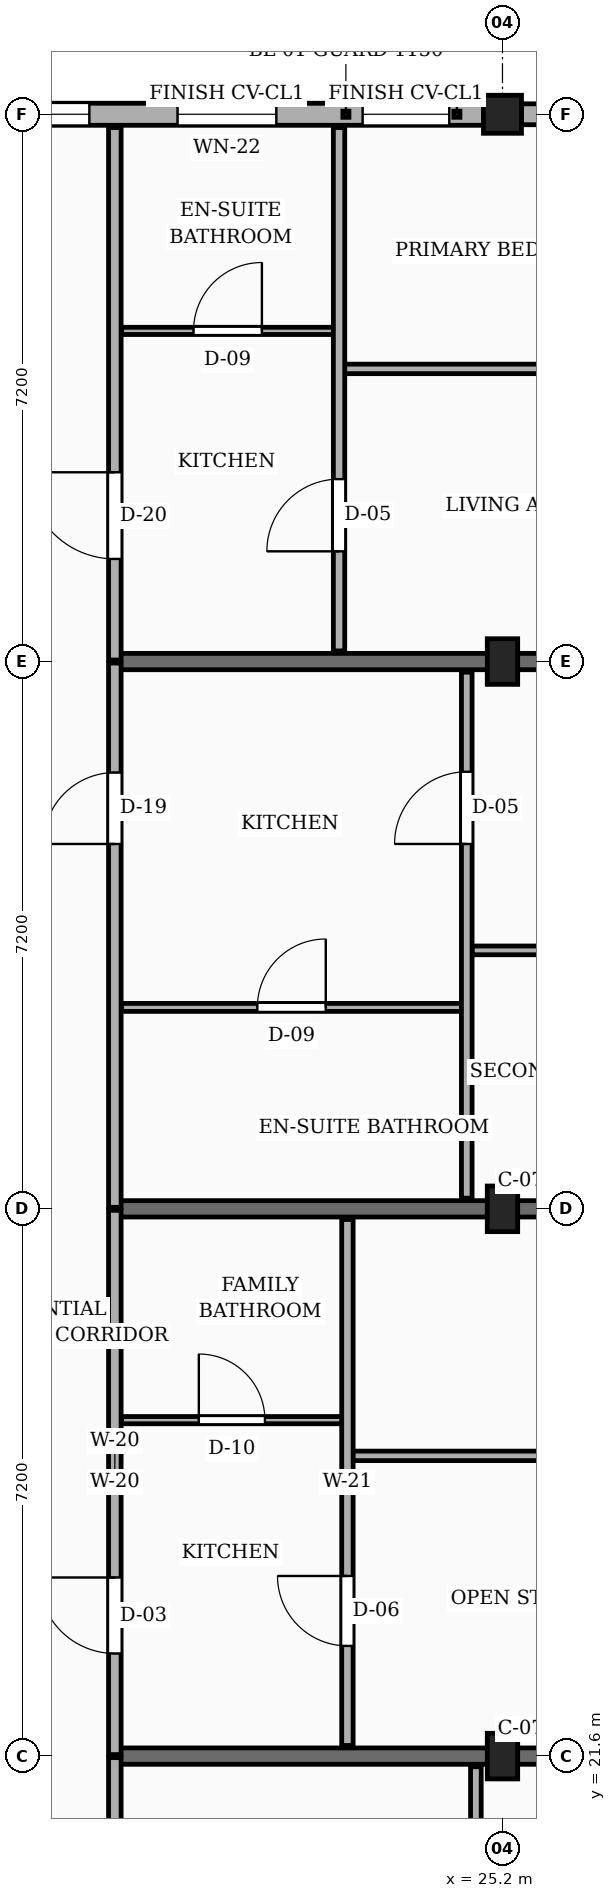
"""IFC4 building model, lengths in metres.
Left out: names, types, materials, properties, quantities, classifications, styles, units other than length and angle.
Written with IfcOpenShell. Run it as: python <this file> out.ifc"""

import sys

from ifc_helpers import new_model, si_unit, direction, frame, frame_2d, origin, origin_2d, place, context, subcontext, project, spatial, rectangle, extrude, element, fill, save


model = new_model("IFC4")
c1 = context("Model", 3, precision=1e-05, world=origin(), true_north=direction((0.0, 1.0)))
c2 = subcontext(c1, "Body", "Model", "MODEL_VIEW")
j1 = project(units=[si_unit("LENGTHUNIT", "METRE"), si_unit("PLANEANGLEUNIT", "RADIAN")], contexts=[c1])
p1 = place(None, origin())
s1 = spatial("IfcSite", under=j1, at=p1, CompositionType="ELEMENT")
p2 = place(p1, origin())
s2 = spatial("IfcBuilding", under=s1, at=p2, CompositionType="ELEMENT")
p3 = place(p2, frame((0.0, 0.0, 26.55)))
s3 = spatial("IfcBuildingStorey", under=s2, at=p3, CompositionType="ELEMENT", Elevation=26.55)
for number, where, z_axis, x_axis in (
    (1, (25.2, 21.6, 0.0), (0.0, 0.0, 1.0), (1.0, 0.0, 0.0)),
    (2, (25.2, 28.8, 0.0), (0.0, 0.0, 1.0), (1.0, 0.0, 0.0)),
    (3, (25.2, 36.0, 0.0), (0.0, 0.0, 1.0), (1.0, 0.0, 0.0)),
):
    element("IfcColumn", number, at=place(p3, frame(where, z_axis=z_axis, x_axis=x_axis)), inside=s3, PredefinedType="COLUMN", context=c2, shape_type="SweptSolid", body=[
        extrude(rectangle(XDim=0.4, YDim=0.6, at=origin_2d()), origin(), (0.0, 0.0, 1.0), 3.15),
    ])
p4 = place(p3, frame((25.2, 43.2, 0.0), z_axis=(0.0, 0.0, 1.0), x_axis=(1.0, 0.0, 0.0)))
e4 = element("IfcColumn", 4, at=p4, inside=s3, PredefinedType="COLUMN", context=c2, shape_type="SweptSolid", body=[
    extrude(rectangle(XDim=0.5, YDim=0.5, at=origin_2d()), origin(), (0.0, 0.0, 1.0), 3.15),
])
for number, where, z_axis, x_axis in (
    (5, (20.1, 21.6, 0.0), (0.0, 0.0, 1.0), (1.0, 0.0, 0.0)),
    (6, (20.1, 28.8, 0.0), (0.0, 0.0, 1.0), (1.0, 0.0, 0.0)),
    (7, (20.1, 36.0, 0.0), (0.0, 0.0, 1.0), (1.0, 0.0, 0.0)),
):
    element("IfcWall", number, at=place(p3, frame(where, z_axis=z_axis, x_axis=x_axis)), inside=s3, PredefinedType="SOLIDWALL", context=c2, shape_type="SweptSolid", body=[
        extrude(rectangle(XDim=12.05, YDim=0.215, at=frame_2d((6.025, 0.0))), origin(), (0.0, 0.0, 1.0), 2.17),
    ])
p5 = place(p3, frame((32.15, 43.2, 0.0), z_axis=(0.0, 0.0, 1.0), x_axis=(-1.0, 0.0, 0.0)))
e8 = element("IfcWall", 8, at=p5, inside=s3, PredefinedType="SOLIDWALL", context=c2, shape_type="SweptSolid", body=[
    extrude(rectangle(XDim=6.7, YDim=0.275, at=frame_2d((3.35, 0.0))), origin(), (0.0, 0.0, 1.0), 2.44),
])
p6 = place(p5, frame((0.45, 0.0, 0.78)))
e9 = element("IfcOpeningElement", 9, at=p6, cuts=e8, PredefinedType="OPENING", context=c2, shape_type="SweptSolid", body=[
    extrude(rectangle(XDim=0.98, YDim=1.36, at=frame_2d((0.49, 0.68))), frame((0.0, 0.147, 0.0), z_axis=(0.0, -1.0, 0.0), x_axis=(1.0, 0.0, 0.0)), (0.0, 0.0, 1.0), 0.295),
])
p7 = place(p5, frame((4.65, 0.0, 0.78)))
e10 = element("IfcOpeningElement", 10, at=p7, cuts=e8, PredefinedType="OPENING", context=c2, shape_type="SweptSolid", body=[
    extrude(rectangle(XDim=1.14, YDim=1.36, at=frame_2d((0.57, 0.68))), frame((0.0, 0.147, 0.0), z_axis=(0.0, -1.0, 0.0), x_axis=(1.0, 0.0, 0.0)), (0.0, 0.0, 1.0), 0.295),
])
p8 = place(p3, frame((24.95, 43.2, 0.0), z_axis=(0.0, 0.0, 1.0), x_axis=(-1.0, 0.0, 0.0)))
e11 = element("IfcWall", 11, at=p8, inside=s3, PredefinedType="SOLIDWALL", context=c2, shape_type="SweptSolid", body=[
    extrude(rectangle(XDim=6.7, YDim=0.29, at=frame_2d((3.35, 0.0))), origin(), (0.0, 0.0, 1.0), 2.44),
])
p9 = place(p8, frame((0.45, 0.0, 0.78)))
e12 = element("IfcOpeningElement", 12, at=p9, cuts=e11, PredefinedType="OPENING", context=c2, shape_type="SweptSolid", body=[
    extrude(rectangle(XDim=1.14, YDim=1.36, at=frame_2d((0.57, 0.68))), frame((0.0, 0.155, 0.0), z_axis=(0.0, -1.0, 0.0), x_axis=(1.0, 0.0, 0.0)), (0.0, 0.0, 1.0), 0.31),
])
p10 = place(p8, frame((2.725, 0.0, 0.78)))
e13 = element("IfcOpeningElement", 13, at=p10, cuts=e11, PredefinedType="OPENING", context=c2, shape_type="SweptSolid", body=[
    extrude(rectangle(XDim=1.3, YDim=1.36, at=frame_2d((0.65, 0.68))), frame((0.0, 0.155, 0.0), z_axis=(0.0, -1.0, 0.0), x_axis=(1.0, 0.0, 0.0)), (0.0, 0.0, 1.0), 0.31),
])
p11 = place(p8, frame((5.185, 0.0, 0.78)))
e14 = element("IfcOpeningElement", 14, at=p11, cuts=e11, PredefinedType="OPENING", context=c2, shape_type="SweptSolid", body=[
    extrude(rectangle(XDim=1.04, YDim=1.26, at=frame_2d((0.52, 0.63))), frame((0.0, 0.155, 0.0), z_axis=(0.0, -1.0, 0.0), x_axis=(1.0, 0.0, 0.0)), (0.0, 0.0, 1.0), 0.31),
])
p12 = place(p3, frame((20.1, 14.42, 0.0), z_axis=(0.0, 0.0, 1.0), x_axis=(0.0, 1.0, 0.0)))
e15 = element("IfcWall", 15, at=p12, inside=s3, PredefinedType="PARTITIONING", context=c2, shape_type="SweptSolid", body=[
    extrude(rectangle(XDim=7.16, YDim=0.165, at=frame_2d((3.58, 0.0))), origin(), (0.0, 0.0, 1.0), 2.305),
])
p13 = place(p12, frame((4.78, 0.0, 0.0)))
e16 = element("IfcOpeningElement", 16, at=p13, cuts=e15, PredefinedType="OPENING", context=c2, shape_type="SweptSolid", body=[
    extrude(rectangle(XDim=1.14, YDim=2.18, at=frame_2d((0.57, 1.09))), frame((0.0, 0.093, 0.0), z_axis=(0.0, -1.0, 0.0), x_axis=(1.0, 0.0, 0.0)), (0.0, 0.0, 1.0), 0.185),
])
p14 = place(p3, frame((20.1, 21.62, 0.0), z_axis=(0.0, 0.0, 1.0), x_axis=(0.0, 1.0, 0.0)))
e17 = element("IfcWall", 17, at=p14, inside=s3, PredefinedType="PARTITIONING", context=c2, shape_type="SweptSolid", body=[
    extrude(rectangle(XDim=7.16, YDim=0.165, at=frame_2d((3.58, 0.0))), origin(), (0.0, 0.0, 1.0), 2.305),
])
p15 = place(p14, frame((1.33, 0.0, 0.0)))
e18 = element("IfcOpeningElement", 18, at=p15, cuts=e17, PredefinedType="OPENING", context=c2, shape_type="SweptSolid", body=[
    extrude(rectangle(XDim=1.0, YDim=2.15, at=frame_2d((0.5, 1.075))), frame((0.0, 0.093, 0.0), z_axis=(0.0, -1.0, 0.0), x_axis=(1.0, 0.0, 0.0)), (0.0, 0.0, 1.0), 0.185),
])
p16 = place(p3, frame((20.1, 28.82, 0.0), z_axis=(0.0, 0.0, 1.0), x_axis=(0.0, 1.0, 0.0)))
e19 = element("IfcWall", 19, at=p16, inside=s3, PredefinedType="PARTITIONING", context=c2, shape_type="SweptSolid", body=[
    extrude(rectangle(XDim=7.16, YDim=0.165, at=frame_2d((3.58, 0.0))), origin(), (0.0, 0.0, 1.0), 2.305),
])
p17 = place(p16, frame((4.78, 0.0, 0.0)))
e20 = element("IfcOpeningElement", 20, at=p17, cuts=e19, PredefinedType="OPENING", context=c2, shape_type="SweptSolid", body=[
    extrude(rectangle(XDim=0.94, YDim=2.12, at=frame_2d((0.47, 1.06))), frame((0.0, 0.093, 0.0), z_axis=(0.0, -1.0, 0.0), x_axis=(1.0, 0.0, 0.0)), (0.0, 0.0, 1.0), 0.185),
])
p18 = place(p3, frame((20.1, 36.02, 0.0), z_axis=(0.0, 0.0, 1.0), x_axis=(0.0, 1.0, 0.0)))
e21 = element("IfcWall", 21, at=p18, inside=s3, PredefinedType="PARTITIONING", context=c2, shape_type="SweptSolid", body=[
    extrude(rectangle(XDim=7.005, YDim=0.165, at=frame_2d((3.502, 0.0))), origin(), (0.0, 0.0, 1.0), 2.305),
])
p19 = place(p18, frame((1.33, 0.0, 0.0)))
e22 = element("IfcOpeningElement", 22, at=p19, cuts=e21, PredefinedType="OPENING", context=c2, shape_type="SweptSolid", body=[
    extrude(rectangle(XDim=1.14, YDim=2.18, at=frame_2d((0.57, 1.09))), frame((0.0, 0.093, 0.0), z_axis=(0.0, -1.0, 0.0), x_axis=(1.0, 0.0, 0.0)), (0.0, 0.0, 1.0), 0.185),
])
p20 = place(p3, frame((24.85, 14.54, 0.0), z_axis=(0.0, 0.0, 1.0), x_axis=(0.0, 1.0, 0.0)))
e23 = element("IfcWall", 23, at=p20, inside=s3, PredefinedType="PARTITIONING", context=c2, shape_type="SweptSolid", body=[
    extrude(rectangle(XDim=6.92, YDim=0.14, at=frame_2d((3.46, 0.0))), origin(), (0.0, 0.0, 1.0), 2.305),
])
p21 = place(p20, frame((4.66, 0.0, 0.0)))
e24 = element("IfcOpeningElement", 24, at=p21, cuts=e23, PredefinedType="OPENING", context=c2, shape_type="SweptSolid", body=[
    extrude(rectangle(XDim=0.95, YDim=2.1, at=frame_2d((0.475, 1.05))), frame((0.0, 0.08, 0.0), z_axis=(0.0, -1.0, 0.0), x_axis=(1.0, 0.0, 0.0)), (0.0, 0.0, 1.0), 0.16),
])
p22 = place(p3, frame((23.23, 25.55, 0.0), z_axis=(0.0, 0.0, 1.0), x_axis=(1.0, 0.0, 0.0)))
e25 = element("IfcWall", 25, at=p22, inside=s3, PredefinedType="PARTITIONING", context=c2, shape_type="SweptSolid", body=[
    extrude(rectangle(XDim=8.995, YDim=0.125, at=frame_2d((4.498, 0.0))), origin(), (0.0, 0.0, 1.0), 2.305),
])
p23 = place(p22, frame((4.058, 0.0, 0.0)))
e26 = element("IfcOpeningElement", 26, at=p23, cuts=e25, PredefinedType="OPENING", context=c2, shape_type="SweptSolid", body=[
    extrude(rectangle(XDim=0.88, YDim=2.08, at=frame_2d((0.44, 1.04))), frame((0.0, 0.073, 0.0), z_axis=(0.0, -1.0, 0.0), x_axis=(1.0, 0.0, 0.0)), (0.0, 0.0, 1.0), 0.145),
])
p24 = place(p3, frame((20.19, 26.02, 0.0), z_axis=(0.0, 0.0, 1.0), x_axis=(1.0, 0.0, 0.0)))
e27 = element("IfcWall", 27, at=p24, inside=s3, PredefinedType="PARTITIONING", context=c2, shape_type="SweptSolid", body=[
    extrude(rectangle(XDim=2.9, YDim=0.095, at=frame_2d((1.45, 0.0))), origin(), (0.0, 0.0, 1.0), 2.305),
])
p25 = place(p24, frame((1.015, 0.0, 0.0)))
e28 = element("IfcOpeningElement", 28, at=p25, cuts=e27, PredefinedType="OPENING", context=c2, shape_type="SweptSolid", body=[
    extrude(rectangle(XDim=0.87, YDim=2.05, at=frame_2d((0.435, 1.025))), frame((0.0, 0.058, 0.0), z_axis=(0.0, -1.0, 0.0), x_axis=(1.0, 0.0, 0.0)), (0.0, 0.0, 1.0), 0.115),
])
p26 = place(p3, frame((23.16, 21.74, 0.0), z_axis=(0.0, 0.0, 1.0), x_axis=(0.0, 1.0, 0.0)))
e29 = element("IfcWall", 29, at=p26, inside=s3, PredefinedType="PARTITIONING", context=c2, shape_type="SweptSolid", body=[
    extrude(rectangle(XDim=6.92, YDim=0.15, at=frame_2d((3.46, 0.0))), origin(), (0.0, 0.0, 1.0), 2.305),
])
p27 = place(p26, frame((1.31, 0.0, 0.0)))
e30 = element("IfcOpeningElement", 30, at=p27, cuts=e29, PredefinedType="OPENING", context=c2, shape_type="SweptSolid", body=[
    extrude(rectangle(XDim=0.92, YDim=2.1, at=frame_2d((0.46, 1.05))), frame((0.0, 0.085, 0.0), z_axis=(0.0, -1.0, 0.0), x_axis=(1.0, 0.0, 0.0)), (0.0, 0.0, 1.0), 0.17),
])
p28 = place(p3, frame((24.8, 32.2, 0.0), z_axis=(0.0, 0.0, 1.0), x_axis=(1.0, 0.0, 0.0)))
e31 = element("IfcWall", 31, at=p28, inside=s3, PredefinedType="PARTITIONING", context=c2, shape_type="SweptSolid", body=[
    extrude(rectangle(XDim=7.425, YDim=0.115, at=frame_2d((3.712, 0.0))), origin(), (0.0, 0.0, 1.0), 2.305),
])
p29 = place(p28, frame((3.262, 0.0, 0.0)))
e32 = element("IfcOpeningElement", 32, at=p29, cuts=e31, PredefinedType="OPENING", context=c2, shape_type="SweptSolid", body=[
    extrude(rectangle(XDim=0.9, YDim=2.1, at=frame_2d((0.45, 1.05))), frame((0.0, 0.067, 0.0), z_axis=(0.0, -1.0, 0.0), x_axis=(1.0, 0.0, 0.0)), (0.0, 0.0, 1.0), 0.135),
])
p30 = place(p3, frame((20.19, 31.45, 0.0), z_axis=(0.0, 0.0, 1.0), x_axis=(1.0, 0.0, 0.0)))
e33 = element("IfcWall", 33, at=p30, inside=s3, PredefinedType="PARTITIONING", context=c2, shape_type="SweptSolid", body=[
    extrude(rectangle(XDim=4.47, YDim=0.105, at=frame_2d((2.235, 0.0))), origin(), (0.0, 0.0, 1.0), 2.305),
])
p31 = place(p30, frame((1.785, 0.0, 0.0)))
e34 = element("IfcOpeningElement", 34, at=p31, cuts=e33, PredefinedType="OPENING", context=c2, shape_type="SweptSolid", body=[
    extrude(rectangle(XDim=0.9, YDim=2.05, at=frame_2d((0.45, 1.025))), frame((0.0, 0.062, 0.0), z_axis=(0.0, -1.0, 0.0), x_axis=(1.0, 0.0, 0.0)), (0.0, 0.0, 1.0), 0.125),
])
p32 = place(p3, frame((24.73, 28.94, 0.0), z_axis=(0.0, 0.0, 1.0), x_axis=(0.0, 1.0, 0.0)))
e35 = element("IfcWall", 35, at=p32, inside=s3, PredefinedType="PARTITIONING", context=c2, shape_type="SweptSolid", body=[
    extrude(rectangle(XDim=6.92, YDim=0.14, at=frame_2d((3.46, 0.0))), origin(), (0.0, 0.0, 1.0), 2.305),
])
p33 = place(p32, frame((4.66, 0.0, 0.0)))
e36 = element("IfcOpeningElement", 36, at=p33, cuts=e35, PredefinedType="OPENING", context=c2, shape_type="SweptSolid", body=[
    extrude(rectangle(XDim=0.95, YDim=2.1, at=frame_2d((0.475, 1.05))), frame((0.0, 0.08, 0.0), z_axis=(0.0, -1.0, 0.0), x_axis=(1.0, 0.0, 0.0)), (0.0, 0.0, 1.0), 0.16),
])
p34 = place(p3, frame((23.12, 39.85, 0.0), z_axis=(0.0, 0.0, 1.0), x_axis=(1.0, 0.0, 0.0)))
e37 = element("IfcWall", 37, at=p34, inside=s3, PredefinedType="PARTITIONING", context=c2, shape_type="SweptSolid", body=[
    extrude(rectangle(XDim=9.105, YDim=0.125, at=frame_2d((4.552, 0.0))), origin(), (0.0, 0.0, 1.0), 2.305),
])
p35 = place(p34, frame((4.103, 0.0, 0.0)))
e38 = element("IfcOpeningElement", 38, at=p35, cuts=e37, PredefinedType="OPENING", context=c2, shape_type="SweptSolid", body=[
    extrude(rectangle(XDim=0.9, YDim=2.1, at=frame_2d((0.45, 1.05))), frame((0.0, 0.073, 0.0), z_axis=(0.0, -1.0, 0.0), x_axis=(1.0, 0.0, 0.0)), (0.0, 0.0, 1.0), 0.145),
])
p36 = place(p3, frame((20.19, 40.35, 0.0), z_axis=(0.0, 0.0, 1.0), x_axis=(1.0, 0.0, 0.0)))
e39 = element("IfcWall", 39, at=p36, inside=s3, PredefinedType="PARTITIONING", context=c2, shape_type="SweptSolid", body=[
    extrude(rectangle(XDim=2.79, YDim=0.095, at=frame_2d((1.395, 0.0))), origin(), (0.0, 0.0, 1.0), 2.305),
])
p37 = place(p36, frame((0.945, 0.0, 0.0)))
e40 = element("IfcOpeningElement", 40, at=p37, cuts=e39, PredefinedType="OPENING", context=c2, shape_type="SweptSolid", body=[
    extrude(rectangle(XDim=0.9, YDim=2.05, at=frame_2d((0.45, 1.025))), frame((0.0, 0.058, 0.0), z_axis=(0.0, -1.0, 0.0), x_axis=(1.0, 0.0, 0.0)), (0.0, 0.0, 1.0), 0.115),
])
p38 = place(p3, frame((23.05, 36.14, 0.0), z_axis=(0.0, 0.0, 1.0), x_axis=(0.0, 1.0, 0.0)))
e41 = element("IfcWall", 41, at=p38, inside=s3, PredefinedType="PARTITIONING", context=c2, shape_type="SweptSolid", body=[
    extrude(rectangle(XDim=6.885, YDim=0.15, at=frame_2d((3.442, 0.0))), origin(), (0.0, 0.0, 1.0), 2.305),
])
p39 = place(p38, frame((1.31, 0.0, 0.0)))
e42 = element("IfcOpeningElement", 42, at=p39, cuts=e41, PredefinedType="OPENING", context=c2, shape_type="SweptSolid", body=[
    extrude(rectangle(XDim=0.95, YDim=2.1, at=frame_2d((0.475, 1.05))), frame((0.0, 0.085, 0.0), z_axis=(0.0, -1.0, 0.0), x_axis=(1.0, 0.0, 0.0)), (0.0, 0.0, 1.0), 0.17),
])
p40 = place(p9, origin())
e43 = element("IfcWindow", 43, at=p40, inside=s3, PartitioningType="SINGLE_PANEL", PredefinedType="WINDOW", context=c2, shape_type="SweptSolid", body=[
    extrude(rectangle(XDim=1.14, YDim=1.36, at=frame_2d((0.57, 0.68))), frame((0.0, 0.03, 0.0), z_axis=(0.0, -1.0, 0.0), x_axis=(1.0, 0.0, 0.0)), (0.0, 0.0, 1.0), 0.06),
])
fill(e12, e43)
p41 = place(p10, origin())
e44 = element("IfcWindow", 44, at=p41, inside=s3, PartitioningType="SINGLE_PANEL", PredefinedType="WINDOW", context=c2, shape_type="SweptSolid", body=[
    extrude(rectangle(XDim=1.3, YDim=1.36, at=frame_2d((0.65, 0.68))), frame((0.0, 0.03, 0.0), z_axis=(0.0, -1.0, 0.0), x_axis=(1.0, 0.0, 0.0)), (0.0, 0.0, 1.0), 0.06),
])
fill(e13, e44)
p42 = place(p11, origin())
e45 = element("IfcWindow", 45, at=p42, inside=s3, PartitioningType="SINGLE_PANEL", PredefinedType="WINDOW", context=c2, shape_type="SweptSolid", body=[
    extrude(rectangle(XDim=1.04, YDim=1.26, at=frame_2d((0.52, 0.63))), frame((0.0, 0.03, 0.0), z_axis=(0.0, -1.0, 0.0), x_axis=(1.0, 0.0, 0.0)), (0.0, 0.0, 1.0), 0.06),
])
fill(e14, e45)
p43 = place(p15, origin())
e46 = element("IfcDoor", 46, at=p43, inside=s3, OperationType="SINGLE_SWING_RIGHT", PredefinedType="DOOR", context=c2, shape_type="SweptSolid", body=[
    extrude(rectangle(XDim=1.0, YDim=2.15, at=frame_2d((0.5, 1.075))), frame((0.0, 0.025, 0.0), z_axis=(0.0, -1.0, 0.0), x_axis=(1.0, 0.0, 0.0)), (0.0, 0.0, 1.0), 0.05),
])
fill(e18, e46)
p44 = place(p17, origin())
e47 = element("IfcDoor", 47, at=p44, inside=s3, OperationType="SINGLE_SWING_LEFT", PredefinedType="DOOR", context=c2, shape_type="SweptSolid", body=[
    extrude(rectangle(XDim=0.94, YDim=2.12, at=frame_2d((0.47, 1.06))), frame((0.0, 0.025, 0.0), z_axis=(0.0, -1.0, 0.0), x_axis=(1.0, 0.0, 0.0)), (0.0, 0.0, 1.0), 0.05),
])
fill(e20, e47)
p45 = place(p19, origin())
e48 = element("IfcDoor", 48, at=p45, inside=s3, OperationType="SINGLE_SWING_RIGHT", PredefinedType="DOOR", context=c2, shape_type="SweptSolid", body=[
    extrude(rectangle(XDim=1.14, YDim=2.18, at=frame_2d((0.57, 1.09))), frame((0.0, 0.025, 0.0), z_axis=(0.0, -1.0, 0.0), x_axis=(1.0, 0.0, 0.0)), (0.0, 0.0, 1.0), 0.05),
])
fill(e22, e48)
p46 = place(p25, origin())
e49 = element("IfcDoor", 49, at=p46, inside=s3, OperationType="SINGLE_SWING_LEFT", PredefinedType="DOOR", context=c2, shape_type="SweptSolid", body=[
    extrude(rectangle(XDim=0.87, YDim=2.05, at=frame_2d((0.435, 1.025))), frame((0.0, 0.025, 0.0), z_axis=(0.0, -1.0, 0.0), x_axis=(1.0, 0.0, 0.0)), (0.0, 0.0, 1.0), 0.05),
])
fill(e28, e49)
p47 = place(p27, origin())
e50 = element("IfcDoor", 50, at=p47, inside=s3, OperationType="SINGLE_SWING_RIGHT", PredefinedType="DOOR", context=c2, shape_type="SweptSolid", body=[
    extrude(rectangle(XDim=0.92, YDim=2.1, at=frame_2d((0.46, 1.05))), frame((0.0, 0.025, 0.0), z_axis=(0.0, -1.0, 0.0), x_axis=(1.0, 0.0, 0.0)), (0.0, 0.0, 1.0), 0.05),
])
fill(e30, e50)
p48 = place(p31, origin())
e51 = element("IfcDoor", 51, at=p48, inside=s3, OperationType="SINGLE_SWING_RIGHT", PredefinedType="DOOR", context=c2, shape_type="SweptSolid", body=[
    extrude(rectangle(XDim=0.9, YDim=2.05, at=frame_2d((0.45, 1.025))), frame((0.0, 0.025, 0.0), z_axis=(0.0, -1.0, 0.0), x_axis=(1.0, 0.0, 0.0)), (0.0, 0.0, 1.0), 0.05),
])
fill(e34, e51)
p49 = place(p33, origin())
e52 = element("IfcDoor", 52, at=p49, inside=s3, OperationType="SINGLE_SWING_LEFT", PredefinedType="DOOR", context=c2, shape_type="SweptSolid", body=[
    extrude(rectangle(XDim=0.95, YDim=2.1, at=frame_2d((0.475, 1.05))), frame((0.0, 0.025, 0.0), z_axis=(0.0, -1.0, 0.0), x_axis=(1.0, 0.0, 0.0)), (0.0, 0.0, 1.0), 0.05),
])
fill(e36, e52)
p50 = place(p37, origin())
e53 = element("IfcDoor", 53, at=p50, inside=s3, OperationType="SINGLE_SWING_RIGHT", PredefinedType="DOOR", context=c2, shape_type="SweptSolid", body=[
    extrude(rectangle(XDim=0.9, YDim=2.05, at=frame_2d((0.45, 1.025))), frame((0.0, 0.025, 0.0), z_axis=(0.0, -1.0, 0.0), x_axis=(1.0, 0.0, 0.0)), (0.0, 0.0, 1.0), 0.05),
])
fill(e40, e53)
p51 = place(p39, origin())
e54 = element("IfcDoor", 54, at=p51, inside=s3, OperationType="SINGLE_SWING_LEFT", PredefinedType="DOOR", context=c2, shape_type="SweptSolid", body=[
    extrude(rectangle(XDim=0.95, YDim=2.1, at=frame_2d((0.475, 1.05))), frame((0.0, 0.025, 0.0), z_axis=(0.0, -1.0, 0.0), x_axis=(1.0, 0.0, 0.0)), (0.0, 0.0, 1.0), 0.05),
])
fill(e42, e54)
save(model, sys.argv[1])
